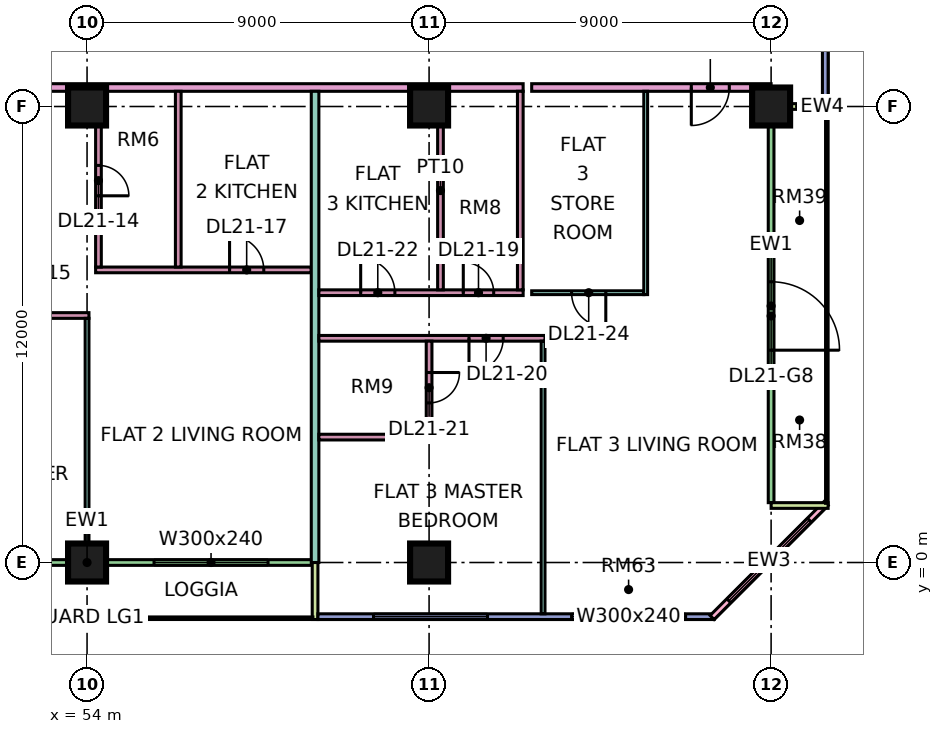
"""IFC4 building model, lengths in metres.
Left out: names, types, materials, properties, quantities, classifications, styles, units other than length and angle.
Written with IfcOpenShell. Run it as: python <this file> out.ifc"""

import sys

from ifc_helpers import new_model, si_unit, direction, frame, frame_2d, origin, origin_2d, place, context, subcontext, project, spatial, rectangle, extrude, element, fill, save


model = new_model("IFC4")
c1 = context("Model", 3, precision=1e-05, world=origin(), true_north=direction((0.0, 1.0)))
c2 = subcontext(c1, "Body", "Model", "MODEL_VIEW")
j1 = project(units=[si_unit("LENGTHUNIT", "METRE"), si_unit("PLANEANGLEUNIT", "RADIAN")], contexts=[c1])
p1 = place(None, origin())
s1 = spatial("IfcSite", under=j1, at=p1, CompositionType="ELEMENT")
p2 = place(p1, origin())
s2 = spatial("IfcBuilding", under=s1, at=p2, CompositionType="ELEMENT")
p3 = place(p2, frame((0.0, 0.0, 95.65)))
s3 = spatial("IfcBuildingStorey", under=s2, at=p3, CompositionType="ELEMENT", Elevation=95.65)
for number, where, z_axis, x_axis in (
    (1, (54.0, 0.0, 0.0), (0.0, 0.0, 1.0), (1.0, 0.0, 0.0)),
    (2, (54.0, 12.0, 0.0), (0.0, 0.0, 1.0), (1.0, 0.0, 0.0)),
    (3, (63.0, 0.0, 0.0), (0.0, 0.0, 1.0), (1.0, 0.0, 0.0)),
    (4, (63.0, 12.0, 0.0), (0.0, 0.0, 1.0), (1.0, 0.0, 0.0)),
    (5, (72.0, 12.0, 0.0), (0.0, 0.0, 1.0), (1.0, 0.0, 0.0)),
):
    element("IfcColumn", number, at=place(p3, frame(where, z_axis=z_axis, x_axis=x_axis)), inside=s3, PredefinedType="COLUMN", context=c2, shape_type="SweptSolid", body=[
        extrude(rectangle(XDim=1.0, YDim=1.0, at=origin_2d()), origin(), (0.0, 0.0, 1.0), 3.75),
    ])
p4 = place(p3, frame((48.075, 0.0, 0.0), z_axis=(0.0, 0.0, 1.0), x_axis=(1.0, 0.0, 0.0)))
e6 = element("IfcWall", 6, at=p4, inside=s3, PredefinedType="SOLIDWALL", context=c2, shape_type="SweptSolid", body=[
    extrude(rectangle(XDim=11.85, YDim=0.15, at=frame_2d((5.925, 0.0))), origin(), (0.0, 0.0, 1.0), 3.35),
])
p5 = place(p4, frame((1.762, 0.0, 0.0)))
e7 = element("IfcOpeningElement", 7, at=p5, cuts=e6, PredefinedType="OPENING", context=c2, shape_type="SweptSolid", body=[
    extrude(rectangle(XDim=1.8, YDim=2.4, at=frame_2d((0.9, 1.2))), frame((0.0, 0.085, 0.0), z_axis=(0.0, -1.0, 0.0), x_axis=(1.0, 0.0, 0.0)), (0.0, 0.0, 1.0), 0.17),
])
p6 = place(p4, frame((7.688, 0.0, 0.45)))
e8 = element("IfcOpeningElement", 8, at=p6, cuts=e6, PredefinedType="OPENING", context=c2, shape_type="SweptSolid", body=[
    extrude(rectangle(XDim=3.0, YDim=2.4, at=frame_2d((1.5, 1.2))), frame((0.0, 0.085, 0.0), z_axis=(0.0, -1.0, 0.0), x_axis=(1.0, 0.0, 0.0)), (0.0, 0.0, 1.0), 0.17),
])
p7 = place(p3, frame((60.0, -1.5, 0.0), z_axis=(0.0, 0.0, 1.0), x_axis=(0.0, 1.0, 0.0)))
e9 = element("IfcWall", 9, at=p7, inside=s3, PredefinedType="SOLIDWALL", context=c2, shape_type="SweptSolid", body=[
    extrude(rectangle(XDim=1.5, YDim=0.15, at=frame_2d((0.75, 0.0))), origin(), (0.0, 0.0, 1.0), 3.35),
])
p8 = place(p3, frame((60.075, -1.425, 0.0), z_axis=(0.0, 0.0, 1.0), x_axis=(1.0, 0.0, 0.0)))
e10 = element("IfcWall", 10, at=p8, inside=s3, PredefinedType="SOLIDWALL", context=c2, shape_type="SweptSolid", body=[
    extrude(rectangle(XDim=10.425, YDim=0.15, at=frame_2d((5.212, 0.0))), origin(), (0.0, 0.0, 1.0), 3.35),
])
p9 = place(p8, frame((1.462, 0.0, 0.45)))
e11 = element("IfcOpeningElement", 11, at=p9, cuts=e10, PredefinedType="OPENING", context=c2, shape_type="SweptSolid", body=[
    extrude(rectangle(XDim=3.0, YDim=2.4, at=frame_2d((1.5, 1.2))), frame((0.0, 0.085, 0.0), z_axis=(0.0, -1.0, 0.0), x_axis=(1.0, 0.0, 0.0)), (0.0, 0.0, 1.0), 0.17),
])
p10 = place(p8, frame((6.675, 0.0, 0.45)))
e12 = element("IfcOpeningElement", 12, at=p10, cuts=e10, PredefinedType="OPENING", context=c2, shape_type="SweptSolid", body=[
    extrude(rectangle(XDim=3.0, YDim=2.4, at=frame_2d((1.5, 1.2))), frame((0.0, 0.085, 0.0), z_axis=(0.0, -1.0, 0.0), x_axis=(1.0, 0.0, 0.0)), (0.0, 0.0, 1.0), 0.17),
])
p11 = place(p3, frame((70.447, -1.447, 0.0), z_axis=(0.0, 0.0, 1.0), x_axis=(0.707106781187, 0.707106781187, 0.0)))
e13 = element("IfcWall", 13, at=p11, inside=s3, PredefinedType="SOLIDWALL", context=c2, shape_type="SweptSolid", body=[
    extrude(rectangle(XDim=4.243, YDim=0.15, at=frame_2d((2.121, 0.0))), origin(), (0.0, 0.0, 1.0), 3.35),
])
p12 = place(p11, frame((0.621, 0.0, 0.45)))
e14 = element("IfcOpeningElement", 14, at=p12, cuts=e13, PredefinedType="OPENING", context=c2, shape_type="SweptSolid", body=[
    extrude(rectangle(XDim=3.0, YDim=2.4, at=frame_2d((1.5, 1.2))), frame((0.0, 0.085, 0.0), z_axis=(0.0, -1.0, 0.0), x_axis=(1.0, 0.0, 0.0)), (0.0, 0.0, 1.0), 0.17),
])
p13 = place(p3, frame((72.0, 1.575, 0.0), z_axis=(0.0, 0.0, 1.0), x_axis=(0.0, 1.0, 0.0)))
e15 = element("IfcWall", 15, at=p13, inside=s3, PredefinedType="SOLIDWALL", context=c2, shape_type="SweptSolid", body=[
    extrude(rectangle(XDim=10.35, YDim=0.15, at=frame_2d((5.175, 0.0))), origin(), (0.0, 0.0, 1.0), 3.35),
])
p14 = place(p13, frame((4.012, 0.0, 0.0)))
e16 = element("IfcOpeningElement", 16, at=p14, cuts=e15, PredefinedType="OPENING", context=c2, shape_type="SweptSolid", body=[
    extrude(rectangle(XDim=1.8, YDim=2.4, at=frame_2d((0.9, 1.2))), frame((0.0, 0.085, 0.0), z_axis=(0.0, -1.0, 0.0), x_axis=(1.0, 0.0, 0.0)), (0.0, 0.0, 1.0), 0.17),
])
for number, where, z_axis, x_axis in (
    (17, (73.5, 1.5, 0.0), (0.0, 0.0, 1.0), (-1.0, 0.0, 0.0)),
    (18, (73.5, 12.0, 0.0), (0.0, 0.0, 1.0), (-1.0, 0.0, 0.0)),
):
    element("IfcWall", number, at=place(p3, frame(where, z_axis=z_axis, x_axis=x_axis)), inside=s3, PredefinedType="SOLIDWALL", context=c2, shape_type="SweptSolid", body=[
        extrude(rectangle(XDim=1.5, YDim=0.15, at=frame_2d((0.75, 0.0))), origin(), (0.0, 0.0, 1.0), 3.35),
    ])
p15 = place(p3, frame((73.425, 12.075, 0.0), z_axis=(0.0, 0.0, 1.0), x_axis=(0.0, 1.0, 0.0)))
e19 = element("IfcWall", 19, at=p15, inside=s3, PredefinedType="SOLIDWALL", context=c2, shape_type="SweptSolid", body=[
    extrude(rectangle(XDim=10.425, YDim=0.15, at=frame_2d((5.212, 0.0))), origin(), (0.0, 0.0, 1.0), 3.35),
])
p16 = place(p15, frame((3.975, 0.0, 0.45)))
e20 = element("IfcOpeningElement", 20, at=p16, cuts=e19, PredefinedType="OPENING", context=c2, shape_type="SweptSolid", body=[
    extrude(rectangle(XDim=1.8, YDim=2.4, at=frame_2d((0.9, 1.2))), frame((0.0, 0.085, 0.0), z_axis=(0.0, -1.0, 0.0), x_axis=(1.0, 0.0, 0.0)), (0.0, 0.0, 1.0), 0.17),
])
p17 = place(p15, frame((8.025, 0.0, 0.45)))
e21 = element("IfcOpeningElement", 21, at=p17, cuts=e19, PredefinedType="OPENING", context=c2, shape_type="SweptSolid", body=[
    extrude(rectangle(XDim=1.8, YDim=2.4, at=frame_2d((0.9, 1.2))), frame((0.0, 0.085, 0.0), z_axis=(0.0, -1.0, 0.0), x_axis=(1.0, 0.0, 0.0)), (0.0, 0.0, 1.0), 0.17),
])
p18 = place(p3, frame((40.65, 12.5, 0.0), z_axis=(0.0, 0.0, 1.0), x_axis=(1.0, 0.0, 0.0)))
e22 = element("IfcWall", 22, at=p18, inside=s3, PredefinedType="PARTITIONING", context=c2, shape_type="SweptSolid", body=[
    extrude(rectangle(XDim=24.825, YDim=0.2, at=frame_2d((12.413, 0.0))), origin(), (0.0, 0.0, 1.0), 3.35),
])
p19 = place(p18, frame((8.4, 0.0, 0.0)))
e23 = element("IfcOpeningElement", 23, at=p19, cuts=e22, PredefinedType="OPENING", context=c2, shape_type="SweptSolid", body=[
    extrude(rectangle(XDim=1.0, YDim=2.1, at=frame_2d((0.5, 1.05))), frame((0.0, 0.11, 0.0), z_axis=(0.0, -1.0, 0.0), x_axis=(1.0, 0.0, 0.0)), (0.0, 0.0, 1.0), 0.22),
])
p20 = place(p18, frame((1.05, 0.0, 0.0)))
e24 = element("IfcOpeningElement", 24, at=p20, cuts=e22, PredefinedType="OPENING", context=c2, shape_type="SweptSolid", body=[
    extrude(rectangle(XDim=1.0, YDim=2.1, at=frame_2d((0.5, 1.05))), frame((0.0, 0.11, 0.0), z_axis=(0.0, -1.0, 0.0), x_axis=(1.0, 0.0, 0.0)), (0.0, 0.0, 1.0), 0.22),
])
p21 = place(p3, frame((48.1, 6.5, 0.0), z_axis=(0.0, 0.0, 1.0), x_axis=(1.0, 0.0, 0.0)))
e25 = element("IfcWall", 25, at=p21, inside=s3, PredefinedType="PARTITIONING", context=c2, shape_type="SweptSolid", body=[
    extrude(rectangle(XDim=5.95, YDim=0.15, at=frame_2d((2.975, 0.0))), origin(), (0.0, 0.0, 1.0), 3.35),
])
p22 = place(p21, frame((3.95, 0.0, 0.0)))
e26 = element("IfcOpeningElement", 26, at=p22, cuts=e25, PredefinedType="OPENING", context=c2, shape_type="SweptSolid", body=[
    extrude(rectangle(XDim=0.9, YDim=2.1, at=frame_2d((0.45, 1.05))), frame((0.0, 0.085, 0.0), z_axis=(0.0, -1.0, 0.0), x_axis=(1.0, 0.0, 0.0)), (0.0, 0.0, 1.0), 0.17),
])
p23 = place(p3, frame((54.0, 0.074, 0.0), z_axis=(0.0, 0.0, 1.0), x_axis=(0.0, 1.0, 0.0)))
e27 = element("IfcWall", 27, at=p23, inside=s3, PredefinedType="PARTITIONING", context=c2, shape_type="SweptSolid", body=[
    extrude(rectangle(XDim=6.351, YDim=0.1, at=frame_2d((3.176, 0.0))), origin(), (0.0, 0.0, 1.0), 3.35),
])
p24 = place(p3, frame((54.225, 7.7, 0.0), z_axis=(0.0, 0.0, 1.0), x_axis=(1.0, 0.0, 0.0)))
e28 = element("IfcWall", 28, at=p24, inside=s3, PredefinedType="PARTITIONING", context=c2, shape_type="SweptSolid", body=[
    extrude(rectangle(XDim=5.675, YDim=0.15, at=frame_2d((2.837, 0.0))), origin(), (0.0, 0.0, 1.0), 3.35),
])
p25 = place(p24, frame((3.525, 0.0, 0.0)))
e29 = element("IfcOpeningElement", 29, at=p25, cuts=e28, PredefinedType="OPENING", context=c2, shape_type="SweptSolid", body=[
    extrude(rectangle(XDim=0.9, YDim=2.1, at=frame_2d((0.45, 1.05))), frame((0.0, 0.085, 0.0), z_axis=(0.0, -1.0, 0.0), x_axis=(1.0, 0.0, 0.0)), (0.0, 0.0, 1.0), 0.17),
])
p26 = place(p3, frame((54.3, 7.775, 0.0), z_axis=(0.0, 0.0, 1.0), x_axis=(0.0, 1.0, 0.0)))
e30 = element("IfcWall", 30, at=p26, inside=s3, PredefinedType="PARTITIONING", context=c2, shape_type="SweptSolid", body=[
    extrude(rectangle(XDim=4.625, YDim=0.15, at=frame_2d((2.312, 0.0))), origin(), (0.0, 0.0, 1.0), 3.35),
])
p27 = place(p26, frame((1.875, 0.0, 0.0)))
e31 = element("IfcOpeningElement", 31, at=p27, cuts=e30, PredefinedType="OPENING", context=c2, shape_type="SweptSolid", body=[
    extrude(rectangle(XDim=0.8, YDim=2.1, at=frame_2d((0.4, 1.05))), frame((0.0, 0.085, 0.0), z_axis=(0.0, -1.0, 0.0), x_axis=(1.0, 0.0, 0.0)), (0.0, 0.0, 1.0), 0.17),
])
p28 = place(p3, frame((56.4, 7.775, 0.0), z_axis=(0.0, 0.0, 1.0), x_axis=(0.0, 1.0, 0.0)))
e32 = element("IfcWall", 32, at=p28, inside=s3, PredefinedType="PARTITIONING", context=c2, shape_type="SweptSolid", body=[
    extrude(rectangle(XDim=4.625, YDim=0.15, at=frame_2d((2.312, 0.0))), origin(), (0.0, 0.0, 1.0), 3.35),
])
p29 = place(p3, frame((60.0, 0.0, 0.0), z_axis=(0.0, 0.0, 1.0), x_axis=(0.0, 1.0, 0.0)))
e33 = element("IfcWall", 33, at=p29, inside=s3, PredefinedType="PARTITIONING", context=c2, shape_type="SweptSolid", body=[
    extrude(rectangle(XDim=12.4, YDim=0.2, at=frame_2d((6.2, 0.0))), origin(), (0.0, 0.0, 1.0), 3.35),
])
p30 = place(p3, frame((60.1, 3.3, 0.0), z_axis=(0.0, 0.0, 1.0), x_axis=(1.0, 0.0, 0.0)))
e34 = element("IfcWall", 34, at=p30, inside=s3, PredefinedType="PARTITIONING", context=c2, shape_type="SweptSolid", body=[
    extrude(rectangle(XDim=2.975, YDim=0.15, at=frame_2d((1.487, 0.0))), origin(), (0.0, 0.0, 1.0), 3.35),
])
p31 = place(p3, frame((60.1, 5.9, 0.0), z_axis=(0.0, 0.0, 1.0), x_axis=(1.0, 0.0, 0.0)))
e35 = element("IfcWall", 35, at=p31, inside=s3, PredefinedType="PARTITIONING", context=c2, shape_type="SweptSolid", body=[
    extrude(rectangle(XDim=5.95, YDim=0.15, at=frame_2d((2.975, 0.0))), origin(), (0.0, 0.0, 1.0), 3.35),
])
p32 = place(p31, frame((3.95, 0.0, 0.0)))
e36 = element("IfcOpeningElement", 36, at=p32, cuts=e35, PredefinedType="OPENING", context=c2, shape_type="SweptSolid", body=[
    extrude(rectangle(XDim=0.9, YDim=2.1, at=frame_2d((0.45, 1.05))), frame((0.0, 0.085, 0.0), z_axis=(0.0, -1.0, 0.0), x_axis=(1.0, 0.0, 0.0)), (0.0, 0.0, 1.0), 0.17),
])
p33 = place(p3, frame((60.1, 7.1, 0.0), z_axis=(0.0, 0.0, 1.0), x_axis=(1.0, 0.0, 0.0)))
e37 = element("IfcWall", 37, at=p33, inside=s3, PredefinedType="PARTITIONING", context=c2, shape_type="SweptSolid", body=[
    extrude(rectangle(XDim=5.375, YDim=0.15, at=frame_2d((2.688, 0.0))), origin(), (0.0, 0.0, 1.0), 3.35),
])
p34 = place(p33, frame((3.8, 0.0, 0.0)))
e38 = element("IfcOpeningElement", 38, at=p34, cuts=e37, PredefinedType="OPENING", context=c2, shape_type="SweptSolid", body=[
    extrude(rectangle(XDim=0.8, YDim=2.1, at=frame_2d((0.4, 1.05))), frame((0.0, 0.085, 0.0), z_axis=(0.0, -1.0, 0.0), x_axis=(1.0, 0.0, 0.0)), (0.0, 0.0, 1.0), 0.17),
])
p35 = place(p33, frame((1.1, 0.0, 0.0)))
e39 = element("IfcOpeningElement", 39, at=p35, cuts=e37, PredefinedType="OPENING", context=c2, shape_type="SweptSolid", body=[
    extrude(rectangle(XDim=0.9, YDim=2.1, at=frame_2d((0.45, 1.05))), frame((0.0, 0.085, 0.0), z_axis=(0.0, -1.0, 0.0), x_axis=(1.0, 0.0, 0.0)), (0.0, 0.0, 1.0), 0.17),
])
p36 = place(p3, frame((63.0, 3.375, 0.0), z_axis=(0.0, 0.0, 1.0), x_axis=(0.0, 1.0, 0.0)))
e40 = element("IfcWall", 40, at=p36, inside=s3, PredefinedType="PARTITIONING", context=c2, shape_type="SweptSolid", body=[
    extrude(rectangle(XDim=2.45, YDim=0.15, at=frame_2d((1.225, 0.0))), origin(), (0.0, 0.0, 1.0), 3.35),
])
p37 = place(p36, frame((0.825, 0.0, 0.0)))
e41 = element("IfcOpeningElement", 41, at=p37, cuts=e40, PredefinedType="OPENING", context=c2, shape_type="SweptSolid", body=[
    extrude(rectangle(XDim=0.8, YDim=2.1, at=frame_2d((0.4, 1.05))), frame((0.0, 0.085, 0.0), z_axis=(0.0, -1.0, 0.0), x_axis=(1.0, 0.0, 0.0)), (0.0, 0.0, 1.0), 0.17),
])
for number, where, z_axis, x_axis in (
    (42, (63.3, 7.175, 0.0), (0.0, 0.0, 1.0), (0.0, 1.0, 0.0)),
    (43, (65.4, 7.175, 0.0), (0.0, 0.0, 1.0), (0.0, 1.0, 0.0)),
):
    element("IfcWall", number, at=place(p3, frame(where, z_axis=z_axis, x_axis=x_axis)), inside=s3, PredefinedType="PARTITIONING", context=c2, shape_type="SweptSolid", body=[
        extrude(rectangle(XDim=5.225, YDim=0.15, at=frame_2d((2.612, 0.0))), origin(), (0.0, 0.0, 1.0), 3.35),
    ])
p38 = place(p3, frame((65.7, 7.1, 0.0), z_axis=(0.0, 0.0, 1.0), x_axis=(1.0, 0.0, 0.0)))
e44 = element("IfcWall", 44, at=p38, inside=s3, PredefinedType="PARTITIONING", context=c2, shape_type="SweptSolid", body=[
    extrude(rectangle(XDim=2.95, YDim=0.1, at=frame_2d((1.475, 0.0))), origin(), (0.0, 0.0, 1.0), 3.35),
])
p39 = place(p38, frame((1.05, 0.0, 0.0)))
e45 = element("IfcOpeningElement", 45, at=p39, cuts=e44, PredefinedType="OPENING", context=c2, shape_type="SweptSolid", body=[
    extrude(rectangle(XDim=0.9, YDim=2.1, at=frame_2d((0.45, 1.05))), frame((0.0, 0.06, 0.0), z_axis=(0.0, -1.0, 0.0), x_axis=(1.0, 0.0, 0.0)), (0.0, 0.0, 1.0), 0.12),
])
p40 = place(p3, frame((65.7, 12.5, 0.0), z_axis=(0.0, 0.0, 1.0), x_axis=(1.0, 0.0, 0.0)))
e46 = element("IfcWall", 46, at=p40, inside=s3, PredefinedType="PARTITIONING", context=c2, shape_type="SweptSolid", body=[
    extrude(rectangle(XDim=6.3, YDim=0.2, at=frame_2d((3.15, 0.0))), origin(), (0.0, 0.0, 1.0), 3.35),
])
p41 = place(p40, frame((4.2, 0.0, 0.0)))
e47 = element("IfcOpeningElement", 47, at=p41, cuts=e46, PredefinedType="OPENING", context=c2, shape_type="SweptSolid", body=[
    extrude(rectangle(XDim=1.0, YDim=2.1, at=frame_2d((0.5, 1.05))), frame((0.0, 0.11, 0.0), z_axis=(0.0, -1.0, 0.0), x_axis=(1.0, 0.0, 0.0)), (0.0, 0.0, 1.0), 0.22),
])
p42 = place(p3, frame((66.0, -1.35, 0.0), z_axis=(0.0, 0.0, 1.0), x_axis=(0.0, 1.0, 0.0)))
e48 = element("IfcWall", 48, at=p42, inside=s3, PredefinedType="PARTITIONING", context=c2, shape_type="SweptSolid", body=[
    extrude(rectangle(XDim=7.175, YDim=0.1, at=frame_2d((3.587, 0.0))), origin(), (0.0, 0.0, 1.0), 3.35),
])
p43 = place(p3, frame((68.7, 7.05, 0.0), z_axis=(0.0, 0.0, 1.0), x_axis=(0.0, 1.0, 0.0)))
e49 = element("IfcWall", 49, at=p43, inside=s3, PredefinedType="PARTITIONING", context=c2, shape_type="SweptSolid", body=[
    extrude(rectangle(XDim=5.35, YDim=0.1, at=frame_2d((2.675, 0.0))), origin(), (0.0, 0.0, 1.0), 3.35),
])
p44 = place(p6, origin())
e50 = element("IfcWindow", 50, at=p44, inside=s3, PartitioningType="SINGLE_PANEL", PredefinedType="WINDOW", context=c2, shape_type="SweptSolid", body=[
    extrude(rectangle(XDim=3.0, YDim=2.4, at=frame_2d((1.5, 1.2))), frame((0.0, 0.03, 0.0), z_axis=(0.0, -1.0, 0.0), x_axis=(1.0, 0.0, 0.0)), (0.0, 0.0, 1.0), 0.06),
])
fill(e8, e50)
p45 = place(p9, origin())
e51 = element("IfcWindow", 51, at=p45, inside=s3, PartitioningType="SINGLE_PANEL", PredefinedType="WINDOW", context=c2, shape_type="SweptSolid", body=[
    extrude(rectangle(XDim=3.0, YDim=2.4, at=frame_2d((1.5, 1.2))), frame((0.0, 0.03, 0.0), z_axis=(0.0, -1.0, 0.0), x_axis=(1.0, 0.0, 0.0)), (0.0, 0.0, 1.0), 0.06),
])
fill(e11, e51)
p46 = place(p10, origin())
e52 = element("IfcWindow", 52, at=p46, inside=s3, PartitioningType="SINGLE_PANEL", PredefinedType="WINDOW", context=c2, shape_type="SweptSolid", body=[
    extrude(rectangle(XDim=3.0, YDim=2.4, at=frame_2d((1.5, 1.2))), frame((0.0, 0.03, 0.0), z_axis=(0.0, -1.0, 0.0), x_axis=(1.0, 0.0, 0.0)), (0.0, 0.0, 1.0), 0.06),
])
fill(e12, e52)
p47 = place(p12, origin())
e53 = element("IfcWindow", 53, at=p47, inside=s3, PartitioningType="SINGLE_PANEL", PredefinedType="WINDOW", context=c2, shape_type="SweptSolid", body=[
    extrude(rectangle(XDim=3.0, YDim=2.4, at=frame_2d((1.5, 1.2))), frame((0.0, 0.03, 0.0), z_axis=(0.0, -1.0, 0.0), x_axis=(1.0, 0.0, 0.0)), (0.0, 0.0, 1.0), 0.06),
])
fill(e14, e53)
p48 = place(p14, frame((1.8, 0.0, 0.0), z_axis=(0.0, 0.0, 1.0), x_axis=(-1.0, 0.0, 0.0)))
e54 = element("IfcDoor", 54, at=p48, inside=s3, OperationType="DOUBLE_DOOR_SINGLE_SWING", PredefinedType="DOOR", context=c2, shape_type="SweptSolid", body=[
    extrude(rectangle(XDim=1.8, YDim=2.4, at=frame_2d((0.9, 1.2))), frame((0.0, 0.025, 0.0), z_axis=(0.0, -1.0, 0.0), x_axis=(1.0, 0.0, 0.0)), (0.0, 0.0, 1.0), 0.05),
])
fill(e16, e54)
p49 = place(p27, frame((0.8, 0.0, 0.0), z_axis=(0.0, 0.0, 1.0), x_axis=(-1.0, 0.0, 0.0)))
e55 = element("IfcDoor", 55, at=p49, inside=s3, OperationType="SINGLE_SWING_LEFT", PredefinedType="DOOR", context=c2, shape_type="SweptSolid", body=[
    extrude(rectangle(XDim=0.8, YDim=2.1, at=frame_2d((0.4, 1.05))), frame((0.0, 0.025, 0.0), z_axis=(0.0, -1.0, 0.0), x_axis=(1.0, 0.0, 0.0)), (0.0, 0.0, 1.0), 0.05),
])
fill(e31, e55)
p50 = place(p25, origin())
e56 = element("IfcDoor", 56, at=p50, inside=s3, OperationType="SINGLE_SWING_LEFT", PredefinedType="DOOR", context=c2, shape_type="SweptSolid", body=[
    extrude(rectangle(XDim=0.9, YDim=2.1, at=frame_2d((0.45, 1.05))), frame((0.0, 0.025, 0.0), z_axis=(0.0, -1.0, 0.0), x_axis=(1.0, 0.0, 0.0)), (0.0, 0.0, 1.0), 0.05),
])
fill(e29, e56)
p51 = place(p34, origin())
e57 = element("IfcDoor", 57, at=p51, inside=s3, OperationType="SINGLE_SWING_LEFT", PredefinedType="DOOR", context=c2, shape_type="SweptSolid", body=[
    extrude(rectangle(XDim=0.8, YDim=2.1, at=frame_2d((0.4, 1.05))), frame((0.0, 0.025, 0.0), z_axis=(0.0, -1.0, 0.0), x_axis=(1.0, 0.0, 0.0)), (0.0, 0.0, 1.0), 0.05),
])
fill(e38, e57)
p52 = place(p32, frame((0.9, 0.0, 0.0), z_axis=(0.0, 0.0, 1.0), x_axis=(-1.0, 0.0, 0.0)))
e58 = element("IfcDoor", 58, at=p52, inside=s3, OperationType="SINGLE_SWING_LEFT", PredefinedType="DOOR", context=c2, shape_type="SweptSolid", body=[
    extrude(rectangle(XDim=0.9, YDim=2.1, at=frame_2d((0.45, 1.05))), frame((0.0, 0.025, 0.0), z_axis=(0.0, -1.0, 0.0), x_axis=(1.0, 0.0, 0.0)), (0.0, 0.0, 1.0), 0.05),
])
fill(e36, e58)
p53 = place(p37, origin())
e59 = element("IfcDoor", 59, at=p53, inside=s3, OperationType="SINGLE_SWING_RIGHT", PredefinedType="DOOR", context=c2, shape_type="SweptSolid", body=[
    extrude(rectangle(XDim=0.8, YDim=2.1, at=frame_2d((0.4, 1.05))), frame((0.0, 0.025, 0.0), z_axis=(0.0, -1.0, 0.0), x_axis=(1.0, 0.0, 0.0)), (0.0, 0.0, 1.0), 0.05),
])
fill(e41, e59)
p54 = place(p35, origin())
e60 = element("IfcDoor", 60, at=p54, inside=s3, OperationType="SINGLE_SWING_LEFT", PredefinedType="DOOR", context=c2, shape_type="SweptSolid", body=[
    extrude(rectangle(XDim=0.9, YDim=2.1, at=frame_2d((0.45, 1.05))), frame((0.0, 0.025, 0.0), z_axis=(0.0, -1.0, 0.0), x_axis=(1.0, 0.0, 0.0)), (0.0, 0.0, 1.0), 0.05),
])
fill(e39, e60)
p55 = place(p41, frame((1.0, 0.0, 0.0), z_axis=(0.0, 0.0, 1.0), x_axis=(-1.0, 0.0, 0.0)))
e61 = element("IfcDoor", 61, at=p55, inside=s3, OperationType="SINGLE_SWING_LEFT", PredefinedType="DOOR", context=c2, shape_type="SweptSolid", body=[
    extrude(rectangle(XDim=1.0, YDim=2.1, at=frame_2d((0.5, 1.05))), frame((0.0, 0.025, 0.0), z_axis=(0.0, -1.0, 0.0), x_axis=(1.0, 0.0, 0.0)), (0.0, 0.0, 1.0), 0.05),
])
fill(e47, e61)
p56 = place(p39, origin())
e62 = element("IfcDoor", 62, at=p56, inside=s3, OperationType="SINGLE_SWING_RIGHT", PredefinedType="DOOR", context=c2, shape_type="SweptSolid", body=[
    extrude(rectangle(XDim=0.9, YDim=2.1, at=frame_2d((0.45, 1.05))), frame((0.0, 0.025, 0.0), z_axis=(0.0, -1.0, 0.0), x_axis=(1.0, 0.0, 0.0)), (0.0, 0.0, 1.0), 0.05),
])
fill(e45, e62)
save(model, sys.argv[1])
